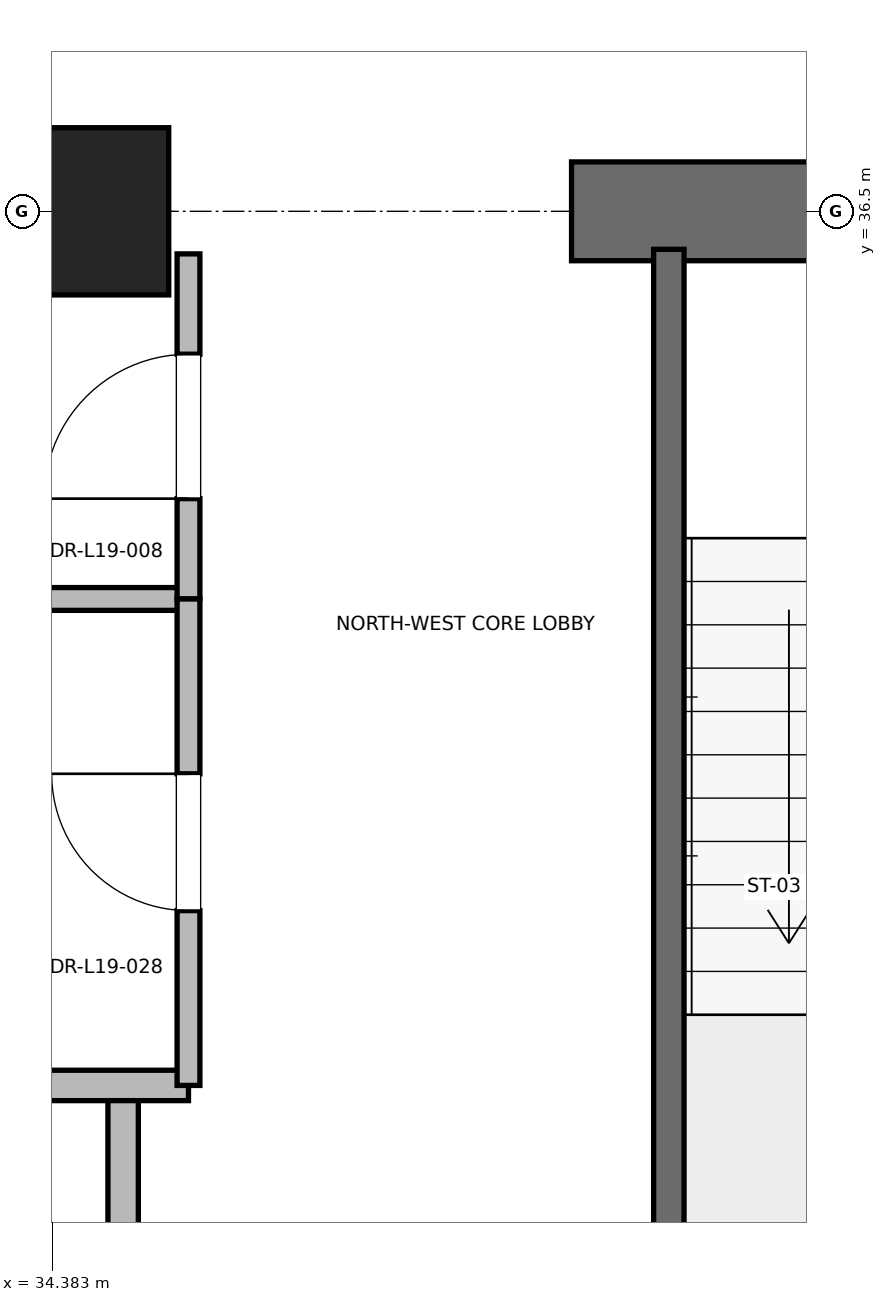
"""IFC4 building model, lengths in metres.
Left out: names, types, materials, properties, quantities, classifications, styles, units other than length and angle.
Written with IfcOpenShell. Run it as: python <this file> out.ifc"""

import sys

from ifc_helpers import new_model, si_unit, direction, frame, frame_2d, origin, origin_2d, place, context, subcontext, project, spatial, rectangle, extrude, element, fill, save


model = new_model("IFC4")
c1 = context("Model", 3, precision=1e-05, world=origin(), true_north=direction((0.0, 1.0)))
c2 = subcontext(c1, "Body", "Model", "MODEL_VIEW")
j1 = project(units=[si_unit("LENGTHUNIT", "METRE"), si_unit("PLANEANGLEUNIT", "RADIAN")], contexts=[c1])
p1 = place(None, origin())
s1 = spatial("IfcSite", under=j1, at=p1, CompositionType="ELEMENT")
p2 = place(p1, origin())
s2 = spatial("IfcBuilding", under=s1, at=p2, CompositionType="ELEMENT")
p3 = place(p2, frame((0.0, 0.0, 83.6)))
s3 = spatial("IfcBuildingStorey", under=s2, at=p3, CompositionType="ELEMENT", Elevation=83.6)
p4 = place(p3, frame((34.6, 36.5, 0.0), z_axis=(0.0, 0.0, 1.0), x_axis=(1.0, 0.0, 0.0)))
e1 = element("IfcColumn", 1, at=p4, inside=s3, PredefinedType="PILASTER", context=c2, shape_type="SweptSolid", body=[
    extrude(rectangle(XDim=1.1, YDim=1.1, at=origin_2d()), origin(), (0.0, 0.0, 1.0), 4.0),
])
p5 = place(p3, frame((29.0, 36.5, 0.0), z_axis=(0.0, 0.0, 1.0), x_axis=(1.0, 0.0, 0.0)))
e2 = element("IfcWall", 2, at=p5, inside=s3, PredefinedType="SHEAR", context=c2, shape_type="SweptSolid", body=[
    extrude(rectangle(XDim=5.8, YDim=0.65, at=frame_2d((2.9, 0.0))), origin(), (0.0, 0.0, 1.0), 3.76),
])
p6 = place(p3, frame((37.8, 36.5, 0.0), z_axis=(0.0, 0.0, 1.0), x_axis=(1.0, 0.0, 0.0)))
e3 = element("IfcWall", 3, at=p6, inside=s3, PredefinedType="SHEAR", context=c2, shape_type="SweptSolid", body=[
    extrude(rectangle(XDim=4.4, YDim=0.65, at=frame_2d((2.2, 0.0))), origin(), (0.0, 0.0, 1.0), 3.76),
])
p7 = place(p6, frame((1.65, 0.0, 0.0)))
e4 = element("IfcOpeningElement", 4, at=p7, cuts=e3, PredefinedType="OPENING", context=c2, shape_type="SweptSolid", body=[
    extrude(rectangle(XDim=1.1, YDim=2.15, at=frame_2d((0.55, 1.075))), frame((0.0, 0.325, 0.0), z_axis=(0.0, -1.0, 0.0), x_axis=(1.0, 0.0, 0.0)), (0.0, 0.0, 1.0), 0.65),
])
p8 = place(p3, frame((38.44, 27.38, 0.0), z_axis=(0.0, 0.0, 1.0), x_axis=(0.0, 1.0, 0.0)))
e5 = element("IfcWall", 5, at=p8, inside=s3, PredefinedType="SOLIDWALL", context=c2, shape_type="SweptSolid", body=[
    extrude(rectangle(XDim=8.87, YDim=0.2, at=frame_2d((4.435, 0.0))), origin(), (0.0, 0.0, 1.0), 3.76),
])
p9 = place(p3, frame((34.85, 27.38, 0.0), z_axis=(0.0, 0.0, 1.0), x_axis=(0.0, 1.0, 0.0)))
e6 = element("IfcWall", 6, at=p9, inside=s3, PredefinedType="PARTITIONING", context=c2, shape_type="SweptSolid", body=[
    extrude(rectangle(XDim=3.37, YDim=0.2, at=frame_2d((1.685, 0.0))), origin(), (0.0, 0.0, 1.0), 3.76),
])
p10 = place(p9, frame((1.11, 0.0, 0.0)))
e7 = element("IfcOpeningElement", 7, at=p10, cuts=e6, PredefinedType="OPENING", context=c2, shape_type="SweptSolid", body=[
    extrude(rectangle(XDim=1.15, YDim=2.2, at=frame_2d((0.575, 1.1))), frame((0.0, 0.1, 0.0), z_axis=(0.0, -1.0, 0.0), x_axis=(1.0, 0.0, 0.0)), (0.0, 0.0, 1.0), 0.2),
])
p11 = place(p3, frame((32.15, 30.75, 0.0), z_axis=(0.0, 0.0, 1.0), x_axis=(1.0, 0.0, 0.0)))
e8 = element("IfcWall", 8, at=p11, inside=s3, PredefinedType="PARTITIONING", context=c2, shape_type="SweptSolid", body=[
    extrude(rectangle(XDim=3.13, YDim=0.2, at=frame_2d((1.565, 0.0))), origin(), (0.0, 0.0, 1.0), 3.76),
])
p12 = place(p3, frame((32.15, 33.95, 0.0), z_axis=(0.0, 0.0, 1.0), x_axis=(1.0, 0.0, 0.0)))
e9 = element("IfcWall", 9, at=p12, inside=s3, PredefinedType="PARTITIONING", context=c2, shape_type="SweptSolid", body=[
    extrude(rectangle(XDim=3.13, YDim=0.15, at=frame_2d((1.565, 0.0))), origin(), (0.0, 0.0, 1.0), 2.85),
])
p13 = place(p3, frame((35.28, 33.95, 0.0), z_axis=(0.0, 0.0, 1.0), x_axis=(0.0, 1.0, 0.0)))
e10 = element("IfcWall", 10, at=p13, inside=s3, PredefinedType="PARTITIONING", context=c2, shape_type="SweptSolid", body=[
    extrude(rectangle(XDim=2.27, YDim=0.15, at=frame_2d((1.135, 0.0))), origin(), (0.0, 0.0, 1.0), 2.54),
])
p14 = place(p13, frame((0.66, 0.0, 0.0)))
e11 = element("IfcOpeningElement", 11, at=p14, cuts=e10, PredefinedType="OPENING", context=c2, shape_type="SweptSolid", body=[
    extrude(rectangle(XDim=0.95, YDim=2.15, at=frame_2d((0.475, 1.075))), frame((0.0, 0.075, 0.0), z_axis=(0.0, -1.0, 0.0), x_axis=(1.0, 0.0, 0.0)), (0.0, 0.0, 1.0), 0.15),
])
p15 = place(p3, frame((35.28, 30.75, 0.0), z_axis=(0.0, 0.0, 1.0), x_axis=(0.0, 1.0, 0.0)))
e12 = element("IfcWall", 12, at=p15, inside=s3, PredefinedType="PARTITIONING", context=c2, shape_type="SweptSolid", body=[
    extrude(rectangle(XDim=3.2, YDim=0.15, at=frame_2d((1.6, 0.0))), origin(), (0.0, 0.0, 1.0), 2.85),
])
p16 = place(p15, frame((1.15, 0.0, 0.0)))
e13 = element("IfcOpeningElement", 13, at=p16, cuts=e12, PredefinedType="OPENING", context=c2, shape_type="SweptSolid", body=[
    extrude(rectangle(XDim=0.9, YDim=2.1, at=frame_2d((0.45, 1.05))), frame((0.0, 0.075, 0.0), z_axis=(0.0, -1.0, 0.0), x_axis=(1.0, 0.0, 0.0)), (0.0, 0.0, 1.0), 0.15),
])
p17 = place(p14, origin())
e14 = element("IfcDoor", 14, at=p17, inside=s3, OperationType="SINGLE_SWING_LEFT", PredefinedType="DOOR", context=c2, shape_type="SweptSolid", body=[
    extrude(rectangle(XDim=0.95, YDim=2.15, at=frame_2d((0.475, 1.075))), frame((0.0, 0.025, 0.0), z_axis=(0.0, -1.0, 0.0), x_axis=(1.0, 0.0, 0.0)), (0.0, 0.0, 1.0), 0.05),
])
fill(e11, e14)
p18 = place(p16, origin())
e15 = element("IfcDoor", 15, at=p18, inside=s3, OperationType="SINGLE_SWING_RIGHT", PredefinedType="DOOR", context=c2, shape_type="SweptSolid", body=[
    extrude(rectangle(XDim=0.9, YDim=2.1, at=frame_2d((0.45, 1.05))), frame((0.0, 0.025, 0.0), z_axis=(0.0, -1.0, 0.0), x_axis=(1.0, 0.0, 0.0)), (0.0, 0.0, 1.0), 0.05),
])
fill(e13, e15)
save(model, sys.argv[1])
